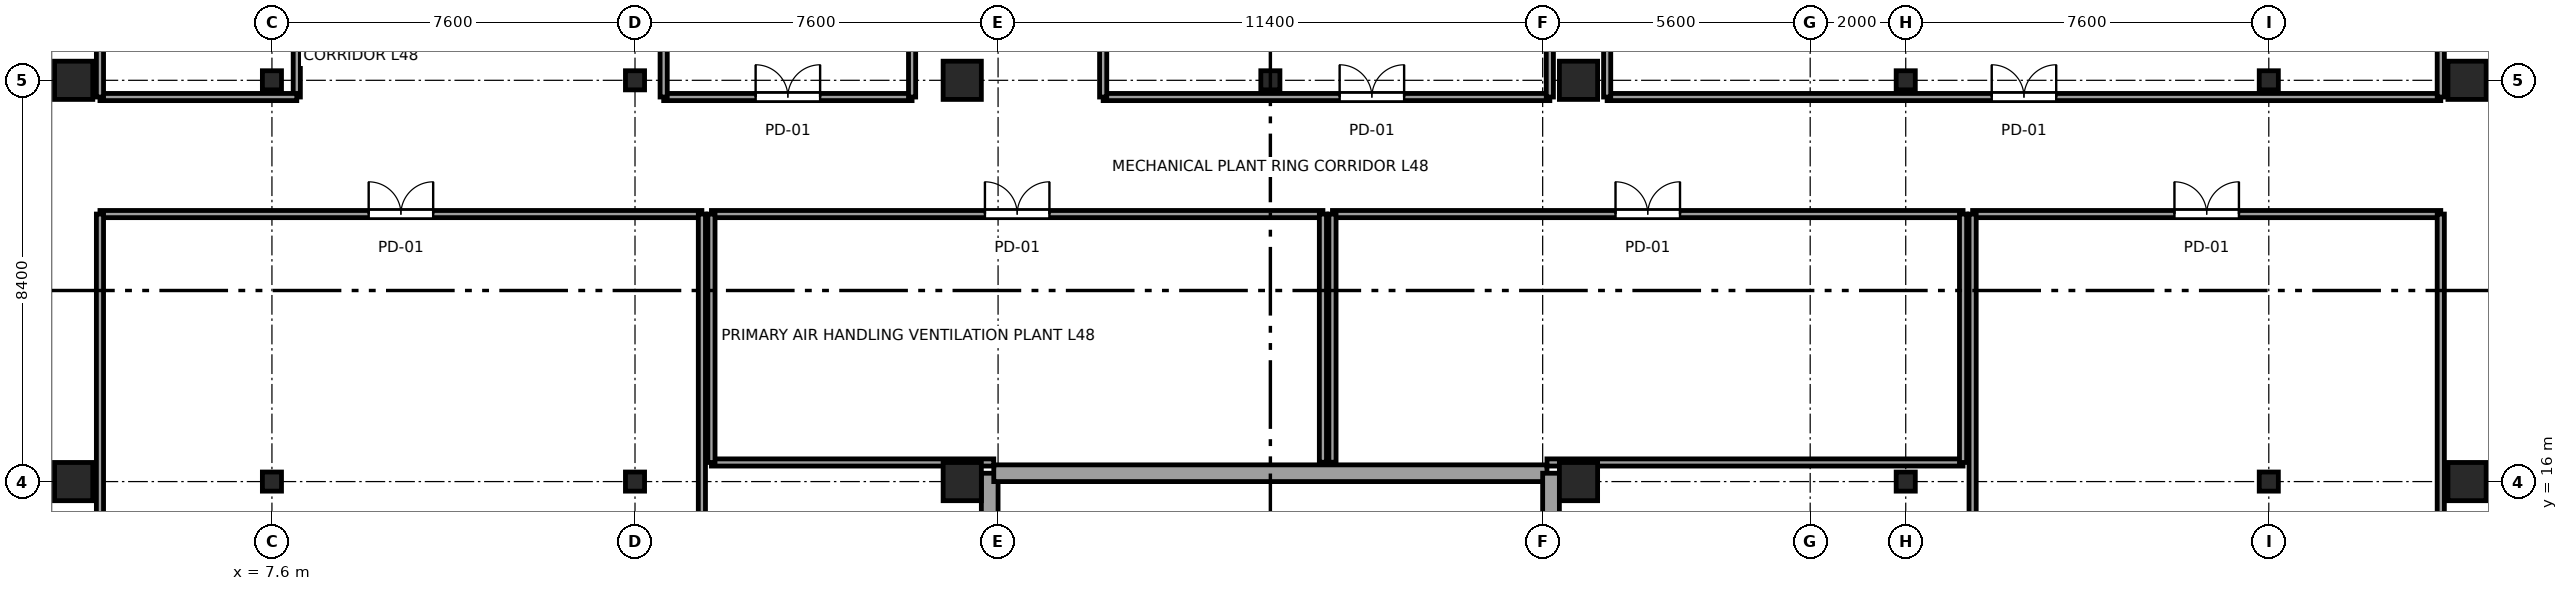
"""IFC4 building model, lengths in metres.
Left out: names, types, materials, properties, quantities, classifications, styles, units other than length and angle.
Written with IfcOpenShell. Run it as: python <this file> out.ifc"""

import sys

from ifc_helpers import new_model, si_unit, direction, frame, frame_2d, origin, origin_2d, place, context, subcontext, project, spatial, rectangle, i_section, extrude, source, transform, mapped, element, fill, save


model = new_model("IFC4")
c1 = context("Model", 3, precision=1e-05, world=origin(), true_north=direction((0.0, 1.0)))
c2 = subcontext(c1, "Body", "Model", "MODEL_VIEW")
j1 = project(units=[si_unit("LENGTHUNIT", "METRE"), si_unit("PLANEANGLEUNIT", "RADIAN")], contexts=[c1])
p1 = place(None, origin())
s1 = spatial("IfcSite", under=j1, at=p1, CompositionType="ELEMENT")
p2 = place(p1, origin())
s2 = spatial("IfcBuilding", under=s1, at=p2, CompositionType="ELEMENT")
p3 = place(p2, frame((0.0, 0.0, 182.55)))
s3 = spatial("IfcBuildingStorey", under=s2, at=p3, CompositionType="ELEMENT", Elevation=182.55)
m1 = source(origin(), c2, "Body", "SweptSolid", [
    extrude(rectangle(XDim=0.8, YDim=0.8, at=origin_2d()), origin(), (0.0, 0.0, 1.0), 5.0),
])
for number, where, z_axis, x_axis in (
    (1, (3.45, 16.0, 0.0), (0.0, 0.0, 1.0), (1.0, 0.0, 0.0)),
    (2, (3.45, 24.4, 0.0), (0.0, 0.0, 1.0), (1.0, 0.0, 0.0)),
):
    element("IfcColumn", number, at=place(p3, frame(where, z_axis=z_axis, x_axis=x_axis)), inside=s3, PredefinedType="COLUMN", context=c2, shape_type="MappedRepresentation", body=[
        mapped(m1, transform((0.0, 0.0, 0.0), x_axis=(1.0, 0.0, 0.0), y_axis=(0.0, 1.0, 0.0), z_axis=(0.0, 0.0, 1.0), scale=1.0)),
    ])
m2 = source(origin(), c2, "Body", "SweptSolid", [
    extrude(i_section(OverallWidth=0.4, OverallDepth=0.4, WebThickness=0.02, FlangeThickness=0.035, at=origin_2d()), origin(), (0.0, 0.0, 1.0), 5.0),
])
for number, where, z_axis, x_axis in (
    (3, (7.6, 16.0, 0.0), (0.0, 0.0, 1.0), (1.0, 0.0, 0.0)),
    (4, (7.6, 24.4, 0.0), (0.0, 0.0, 1.0), (1.0, 0.0, 0.0)),
    (5, (15.2, 16.0, 0.0), (0.0, 0.0, 1.0), (1.0, 0.0, 0.0)),
    (6, (15.2, 24.4, 0.0), (0.0, 0.0, 1.0), (1.0, 0.0, 0.0)),
):
    element("IfcColumn", number, at=place(p3, frame(where, z_axis=z_axis, x_axis=x_axis)), inside=s3, PredefinedType="COLUMN", context=c2, shape_type="MappedRepresentation", body=[
        mapped(m2, transform((0.0, 0.0, 0.0), x_axis=(1.0, 0.0, 0.0), y_axis=(0.0, 1.0, 0.0), z_axis=(0.0, 0.0, 1.0), scale=1.0)),
    ])
for number, where, z_axis, x_axis in (
    (7, (22.05, 16.0, 0.0), (0.0, 0.0, 1.0), (1.0, 0.0, 0.0)),
    (8, (22.05, 24.4, 0.0), (0.0, 0.0, 1.0), (1.0, 0.0, 0.0)),
    (9, (34.95, 16.0, 0.0), (0.0, 0.0, 1.0), (1.0, 0.0, 0.0)),
    (10, (34.95, 24.4, 0.0), (0.0, 0.0, 1.0), (1.0, 0.0, 0.0)),
):
    element("IfcColumn", number, at=place(p3, frame(where, z_axis=z_axis, x_axis=x_axis)), inside=s3, PredefinedType="COLUMN", context=c2, shape_type="MappedRepresentation", body=[
        mapped(m1, transform((0.0, 0.0, 0.0), x_axis=(1.0, 0.0, 0.0), y_axis=(0.0, 1.0, 0.0), z_axis=(0.0, 0.0, 1.0), scale=1.0)),
    ])
for number, where, z_axis, x_axis in (
    (11, (41.8, 16.0, 0.0), (0.0, 0.0, 1.0), (1.0, 0.0, 0.0)),
    (12, (41.8, 24.4, 0.0), (0.0, 0.0, 1.0), (1.0, 0.0, 0.0)),
    (13, (49.4, 16.0, 0.0), (0.0, 0.0, 1.0), (1.0, 0.0, 0.0)),
    (14, (49.4, 24.4, 0.0), (0.0, 0.0, 1.0), (1.0, 0.0, 0.0)),
):
    element("IfcColumn", number, at=place(p3, frame(where, z_axis=z_axis, x_axis=x_axis)), inside=s3, PredefinedType="COLUMN", context=c2, shape_type="MappedRepresentation", body=[
        mapped(m2, transform((0.0, 0.0, 0.0), x_axis=(1.0, 0.0, 0.0), y_axis=(0.0, 1.0, 0.0), z_axis=(0.0, 0.0, 1.0), scale=1.0)),
    ])
for number, where, z_axis, x_axis in (
    (15, (53.55, 16.0, 0.0), (0.0, 0.0, 1.0), (1.0, 0.0, 0.0)),
    (16, (53.55, 24.4, 0.0), (0.0, 0.0, 1.0), (1.0, 0.0, 0.0)),
):
    element("IfcColumn", number, at=place(p3, frame(where, z_axis=z_axis, x_axis=x_axis)), inside=s3, PredefinedType="COLUMN", context=c2, shape_type="MappedRepresentation", body=[
        mapped(m1, transform((0.0, 0.0, 0.0), x_axis=(1.0, 0.0, 0.0), y_axis=(0.0, 1.0, 0.0), z_axis=(0.0, 0.0, 1.0), scale=1.0)),
    ])
p4 = place(p3, frame((28.5, 24.4, 0.0), z_axis=(0.0, 0.0, 1.0), x_axis=(1.0, 0.0, 0.0)))
e17 = element("IfcColumn", 17, at=p4, inside=s3, PredefinedType="COLUMN", context=c2, shape_type="MappedRepresentation", body=[
    mapped(m2, transform((0.0, 0.0, 0.0), x_axis=(1.0, 0.0, 0.0), y_axis=(0.0, 1.0, 0.0), z_axis=(0.0, 0.0, 1.0), scale=1.0)),
])
p5 = place(p3, frame((22.625, 2.775, 0.0), z_axis=(0.0, 0.0, 1.0), x_axis=(0.0, 1.0, 0.0)))
e18 = element("IfcWall", 18, at=p5, inside=s3, PredefinedType="SOLIDWALL", context=c2, shape_type="SweptSolid", body=[
    extrude(rectangle(XDim=13.4, YDim=0.35, at=frame_2d((6.7, 0.0))), origin(), (0.0, 0.0, 1.0), 4.82),
])
p6 = place(p3, frame((22.71, 16.175, 0.0), z_axis=(0.0, 0.0, 1.0), x_axis=(1.0, 0.0, 0.0)))
e19 = element("IfcWall", 19, at=p6, inside=s3, PredefinedType="SOLIDWALL", context=c2, shape_type="SweptSolid", body=[
    extrude(rectangle(XDim=11.58, YDim=0.35, at=frame_2d((5.79, 0.0))), origin(), (0.0, 0.0, 1.0), 4.208),
])
p7 = place(p3, frame((34.375, 16.175, 0.0), z_axis=(0.0, 0.0, 1.0), x_axis=(0.0, -1.0, 0.0)))
e20 = element("IfcWall", 20, at=p7, inside=s3, PredefinedType="SOLIDWALL", context=c2, shape_type="SweptSolid", body=[
    extrude(rectangle(XDim=13.4, YDim=0.35, at=frame_2d((6.7, 0.0))), origin(), (0.0, 0.0, 1.0), 4.82),
])
p8 = place(p3, frame((8.12, 24.05, 0.0), z_axis=(0.0, 0.0, 1.0), x_axis=(0.0, 1.0, 0.0)))
e21 = element("IfcWall", 21, at=p8, inside=s3, PredefinedType="PARTITIONING", context=c2, shape_type="SweptSolid", body=[
    extrude(rectangle(XDim=11.55, YDim=0.15, at=frame_2d((5.775, 0.0))), origin(), (0.0, 0.0, 1.0), 4.82),
])
p9 = place(p8, frame((4.125, 0.0, 0.0)))
e22 = element("IfcOpeningElement", 22, at=p9, cuts=e21, PredefinedType="OPENING", context=c2, shape_type="SweptSolid", body=[
    extrude(rectangle(XDim=1.35, YDim=2.15, at=frame_2d((0.675, 1.075))), frame((0.0, 0.085, 0.0), z_axis=(0.0, -1.0, 0.0), x_axis=(1.0, 0.0, 0.0)), (0.0, 0.0, 1.0), 0.17),
])
p10 = place(p3, frame((4.0, 24.05, 0.0), z_axis=(0.0, 0.0, 1.0), x_axis=(1.0, 0.0, 0.0)))
e23 = element("IfcWall", 23, at=p10, inside=s3, PredefinedType="PARTITIONING", context=c2, shape_type="SweptSolid", body=[
    extrude(rectangle(XDim=4.12, YDim=0.15, at=frame_2d((2.06, 0.0))), origin(), (0.0, 0.0, 1.0), 4.82),
])
p11 = place(p3, frame((4.0, 24.05, 0.0), z_axis=(0.0, 0.0, 1.0), x_axis=(0.0, 1.0, 0.0)))
e24 = element("IfcWall", 24, at=p11, inside=s3, PredefinedType="PARTITIONING", context=c2, shape_type="SweptSolid", body=[
    extrude(rectangle(XDim=11.55, YDim=0.15, at=frame_2d((5.775, 0.0))), origin(), (0.0, 0.0, 1.0), 4.282),
])
p12 = place(p3, frame((15.8, 24.05, 0.0), z_axis=(0.0, 0.0, 1.0), x_axis=(1.0, 0.0, 0.0)))
e25 = element("IfcWall", 25, at=p12, inside=s3, PredefinedType="PARTITIONING", context=c2, shape_type="SweptSolid", body=[
    extrude(rectangle(XDim=5.2, YDim=0.15, at=frame_2d((2.6, 0.0))), origin(), (0.0, 0.0, 1.0), 4.82),
])
p13 = place(p12, frame((1.925, 0.0, 0.0)))
e26 = element("IfcOpeningElement", 26, at=p13, cuts=e25, PredefinedType="OPENING", context=c2, shape_type="SweptSolid", body=[
    extrude(rectangle(XDim=1.35, YDim=2.15, at=frame_2d((0.675, 1.075))), frame((0.0, 0.085, 0.0), z_axis=(0.0, -1.0, 0.0), x_axis=(1.0, 0.0, 0.0)), (0.0, 0.0, 1.0), 0.17),
])
for number, where, z_axis, x_axis in (
    (27, (15.8, 24.05, 0.0), (0.0, 0.0, 1.0), (0.0, 1.0, 0.0)),
    (28, (21.0, 24.05, 0.0), (0.0, 0.0, 1.0), (0.0, 1.0, 0.0)),
):
    element("IfcWall", number, at=place(p3, frame(where, z_axis=z_axis, x_axis=x_axis)), inside=s3, PredefinedType="PARTITIONING", context=c2, shape_type="SweptSolid", body=[
        extrude(rectangle(XDim=5.4, YDim=0.15, at=frame_2d((2.7, 0.0))), origin(), (0.0, 0.0, 1.0), 4.82),
    ])
p14 = place(p3, frame((25.0, 24.05, 0.0), z_axis=(0.0, 0.0, 1.0), x_axis=(1.0, 0.0, 0.0)))
e29 = element("IfcWall", 29, at=p14, inside=s3, PredefinedType="PARTITIONING", context=c2, shape_type="SweptSolid", body=[
    extrude(rectangle(XDim=9.35, YDim=0.15, at=frame_2d((4.675, 0.0))), origin(), (0.0, 0.0, 1.0), 4.82),
])
p15 = place(p14, frame((4.95, 0.0, 0.0)))
e30 = element("IfcOpeningElement", 30, at=p15, cuts=e29, PredefinedType="OPENING", context=c2, shape_type="SweptSolid", body=[
    extrude(rectangle(XDim=1.35, YDim=2.15, at=frame_2d((0.675, 1.075))), frame((0.0, 0.085, 0.0), z_axis=(0.0, -1.0, 0.0), x_axis=(1.0, 0.0, 0.0)), (0.0, 0.0, 1.0), 0.17),
])
for number, where, z_axis, x_axis in (
    (31, (25.0, 24.05, 0.0), (0.0, 0.0, 1.0), (0.0, 1.0, 0.0)),
    (32, (34.35, 24.05, 0.0), (0.0, 0.0, 1.0), (0.0, 1.0, 0.0)),
):
    element("IfcWall", number, at=place(p3, frame(where, z_axis=z_axis, x_axis=x_axis)), inside=s3, PredefinedType="PARTITIONING", context=c2, shape_type="SweptSolid", body=[
        extrude(rectangle(XDim=5.4, YDim=0.15, at=frame_2d((2.7, 0.0))), origin(), (0.0, 0.0, 1.0), 4.82),
    ])
p16 = place(p3, frame((35.55, 24.05, 0.0), z_axis=(0.0, 0.0, 1.0), x_axis=(1.0, 0.0, 0.0)))
e33 = element("IfcWall", 33, at=p16, inside=s3, PredefinedType="PARTITIONING", context=c2, shape_type="SweptSolid", body=[
    extrude(rectangle(XDim=17.45, YDim=0.15, at=frame_2d((8.725, 0.0))), origin(), (0.0, 0.0, 1.0), 4.82),
])
p17 = place(p16, frame((8.05, 0.0, 0.0)))
e34 = element("IfcOpeningElement", 34, at=p17, cuts=e33, PredefinedType="OPENING", context=c2, shape_type="SweptSolid", body=[
    extrude(rectangle(XDim=1.35, YDim=2.15, at=frame_2d((0.675, 1.075))), frame((0.0, 0.085, 0.0), z_axis=(0.0, -1.0, 0.0), x_axis=(1.0, 0.0, 0.0)), (0.0, 0.0, 1.0), 0.17),
])
for number, where, z_axis, x_axis in (
    (35, (35.55, 24.05, 0.0), (0.0, 0.0, 1.0), (0.0, 1.0, 0.0)),
    (36, (53.0, 24.05, 0.0), (0.0, 0.0, 1.0), (0.0, 1.0, 0.0)),
):
    element("IfcWall", number, at=place(p3, frame(where, z_axis=z_axis, x_axis=x_axis)), inside=s3, PredefinedType="PARTITIONING", context=c2, shape_type="SweptSolid", body=[
        extrude(rectangle(XDim=5.4, YDim=0.15, at=frame_2d((2.7, 0.0))), origin(), (0.0, 0.0, 1.0), 4.82),
    ])
p18 = place(p3, frame((4.0, 21.6, 0.0), z_axis=(0.0, 0.0, 1.0), x_axis=(1.0, 0.0, 0.0)))
e37 = element("IfcWall", 37, at=p18, inside=s3, PredefinedType="PARTITIONING", context=c2, shape_type="SweptSolid", body=[
    extrude(rectangle(XDim=12.6, YDim=0.15, at=frame_2d((6.3, 0.0))), origin(), (0.0, 0.0, 1.0), 4.82),
])
p19 = place(p18, frame((5.625, 0.0, 0.0)))
e38 = element("IfcOpeningElement", 38, at=p19, cuts=e37, PredefinedType="OPENING", context=c2, shape_type="SweptSolid", body=[
    extrude(rectangle(XDim=1.35, YDim=2.15, at=frame_2d((0.675, 1.075))), frame((0.0, 0.085, 0.0), z_axis=(0.0, -1.0, 0.0), x_axis=(1.0, 0.0, 0.0)), (0.0, 0.0, 1.0), 0.17),
])
p20 = place(p3, frame((4.0, 5.385, 0.0), z_axis=(0.0, 0.0, 1.0), x_axis=(0.0, 1.0, 0.0)))
e39 = element("IfcWall", 39, at=p20, inside=s3, PredefinedType="PARTITIONING", context=c2, shape_type="SweptSolid", body=[
    extrude(rectangle(XDim=16.215, YDim=0.15, at=frame_2d((8.107, 0.0))), origin(), (0.0, 0.0, 1.0), 4.282),
])
p21 = place(p3, frame((16.6, 3.005, 0.0), z_axis=(0.0, 0.0, 1.0), x_axis=(0.0, 1.0, 0.0)))
e40 = element("IfcWall", 40, at=p21, inside=s3, PredefinedType="PARTITIONING", context=c2, shape_type="SweptSolid", body=[
    extrude(rectangle(XDim=18.595, YDim=0.15, at=frame_2d((9.298, 0.0))), origin(), (0.0, 0.0, 1.0), 4.82),
])
p22 = place(p3, frame((16.8, 16.4, 0.0), z_axis=(0.0, 0.0, 1.0), x_axis=(1.0, 0.0, 0.0)))
e41 = element("IfcWall", 41, at=p22, inside=s3, PredefinedType="PARTITIONING", context=c2, shape_type="SweptSolid", body=[
    extrude(rectangle(XDim=5.91, YDim=0.15, at=frame_2d((2.955, 0.0))), origin(), (0.0, 0.0, 1.0), 4.82),
])
p23 = place(p3, frame((16.8, 21.6, 0.0), z_axis=(0.0, 0.0, 1.0), x_axis=(1.0, 0.0, 0.0)))
e42 = element("IfcWall", 42, at=p23, inside=s3, PredefinedType="PARTITIONING", context=c2, shape_type="SweptSolid", body=[
    extrude(rectangle(XDim=12.8, YDim=0.15, at=frame_2d((6.4, 0.0))), origin(), (0.0, 0.0, 1.0), 4.82),
])
p24 = place(p23, frame((5.725, 0.0, 0.0)))
e43 = element("IfcOpeningElement", 43, at=p24, cuts=e42, PredefinedType="OPENING", context=c2, shape_type="SweptSolid", body=[
    extrude(rectangle(XDim=1.35, YDim=2.15, at=frame_2d((0.675, 1.075))), frame((0.0, 0.085, 0.0), z_axis=(0.0, -1.0, 0.0), x_axis=(1.0, 0.0, 0.0)), (0.0, 0.0, 1.0), 0.17),
])
p25 = place(p3, frame((16.8, 16.4, 0.0), z_axis=(0.0, 0.0, 1.0), x_axis=(0.0, 1.0, 0.0)))
e44 = element("IfcWall", 44, at=p25, inside=s3, PredefinedType="PARTITIONING", context=c2, shape_type="SweptSolid", body=[
    extrude(rectangle(XDim=5.2, YDim=0.15, at=frame_2d((2.6, 0.0))), origin(), (0.0, 0.0, 1.0), 4.82),
])
p26 = place(p3, frame((29.6, 16.405, 0.0), z_axis=(0.0, 0.0, 1.0), x_axis=(0.0, 1.0, 0.0)))
e45 = element("IfcWall", 45, at=p26, inside=s3, PredefinedType="PARTITIONING", context=c2, shape_type="SweptSolid", body=[
    extrude(rectangle(XDim=5.195, YDim=0.15, at=frame_2d((2.598, 0.0))), origin(), (0.0, 0.0, 1.0), 4.82),
])
p27 = place(p3, frame((34.29, 16.4, 0.0), z_axis=(0.0, 0.0, 1.0), x_axis=(1.0, 0.0, 0.0)))
e46 = element("IfcWall", 46, at=p27, inside=s3, PredefinedType="PARTITIONING", context=c2, shape_type="SweptSolid", body=[
    extrude(rectangle(XDim=8.71, YDim=0.15, at=frame_2d((4.355, 0.0))), origin(), (0.0, 0.0, 1.0), 4.82),
])
p28 = place(p3, frame((29.8, 21.6, 0.0), z_axis=(0.0, 0.0, 1.0), x_axis=(1.0, 0.0, 0.0)))
e47 = element("IfcWall", 47, at=p28, inside=s3, PredefinedType="PARTITIONING", context=c2, shape_type="SweptSolid", body=[
    extrude(rectangle(XDim=13.2, YDim=0.15, at=frame_2d((6.6, 0.0))), origin(), (0.0, 0.0, 1.0), 4.82),
])
p29 = place(p28, frame((5.925, 0.0, 0.0)))
e48 = element("IfcOpeningElement", 48, at=p29, cuts=e47, PredefinedType="OPENING", context=c2, shape_type="SweptSolid", body=[
    extrude(rectangle(XDim=1.35, YDim=2.15, at=frame_2d((0.675, 1.075))), frame((0.0, 0.085, 0.0), z_axis=(0.0, -1.0, 0.0), x_axis=(1.0, 0.0, 0.0)), (0.0, 0.0, 1.0), 0.17),
])
p30 = place(p3, frame((29.8, 16.405, 0.0), z_axis=(0.0, 0.0, 1.0), x_axis=(0.0, 1.0, 0.0)))
e49 = element("IfcWall", 49, at=p30, inside=s3, PredefinedType="PARTITIONING", context=c2, shape_type="SweptSolid", body=[
    extrude(rectangle(XDim=5.195, YDim=0.15, at=frame_2d((2.598, 0.0))), origin(), (0.0, 0.0, 1.0), 4.82),
])
p31 = place(p3, frame((43.0, 16.4, 0.0), z_axis=(0.0, 0.0, 1.0), x_axis=(0.0, 1.0, 0.0)))
e50 = element("IfcWall", 50, at=p31, inside=s3, PredefinedType="PARTITIONING", context=c2, shape_type="SweptSolid", body=[
    extrude(rectangle(XDim=5.2, YDim=0.15, at=frame_2d((2.6, 0.0))), origin(), (0.0, 0.0, 1.0), 4.82),
])
p32 = place(p3, frame((43.2, 21.6, 0.0), z_axis=(0.0, 0.0, 1.0), x_axis=(1.0, 0.0, 0.0)))
e51 = element("IfcWall", 51, at=p32, inside=s3, PredefinedType="PARTITIONING", context=c2, shape_type="SweptSolid", body=[
    extrude(rectangle(XDim=9.8, YDim=0.15, at=frame_2d((4.9, 0.0))), origin(), (0.0, 0.0, 1.0), 4.82),
])
p33 = place(p32, frame((4.225, 0.0, 0.0)))
e52 = element("IfcOpeningElement", 52, at=p33, cuts=e51, PredefinedType="OPENING", context=c2, shape_type="SweptSolid", body=[
    extrude(rectangle(XDim=1.35, YDim=2.15, at=frame_2d((0.675, 1.075))), frame((0.0, 0.085, 0.0), z_axis=(0.0, -1.0, 0.0), x_axis=(1.0, 0.0, 0.0)), (0.0, 0.0, 1.0), 0.17),
])
p34 = place(p3, frame((43.2, 3.005, 0.0), z_axis=(0.0, 0.0, 1.0), x_axis=(0.0, 1.0, 0.0)))
e53 = element("IfcWall", 53, at=p34, inside=s3, PredefinedType="PARTITIONING", context=c2, shape_type="SweptSolid", body=[
    extrude(rectangle(XDim=18.595, YDim=0.15, at=frame_2d((9.298, 0.0))), origin(), (0.0, 0.0, 1.0), 4.82),
])
p35 = place(p3, frame((53.0, 5.385, 0.0), z_axis=(0.0, 0.0, 1.0), x_axis=(0.0, 1.0, 0.0)))
e54 = element("IfcWall", 54, at=p35, inside=s3, PredefinedType="PARTITIONING", context=c2, shape_type="SweptSolid", body=[
    extrude(rectangle(XDim=16.215, YDim=0.15, at=frame_2d((8.107, 0.0))), origin(), (0.0, 0.0, 1.0), 4.282),
])
m3 = source(origin(), c2, "Body", "SweptSolid", [
    extrude(rectangle(XDim=1.35, YDim=2.15, at=frame_2d((0.675, 1.075))), frame((0.0, 0.025, 0.0), z_axis=(0.0, -1.0, 0.0), x_axis=(1.0, 0.0, 0.0)), (0.0, 0.0, 1.0), 0.05),
])
p36 = place(p13, origin())
e55 = element("IfcDoor", 55, at=p36, inside=s3, OperationType="DOUBLE_DOOR_SINGLE_SWING", PredefinedType="DOOR", context=c2, shape_type="MappedRepresentation", body=[
    mapped(m3, transform((0.0, 0.0, 0.0), x_axis=(1.0, 0.0, 0.0), y_axis=(0.0, 1.0, 0.0), z_axis=(0.0, 0.0, 1.0), scale=1.0)),
])
fill(e26, e55)
p37 = place(p15, origin())
e56 = element("IfcDoor", 56, at=p37, inside=s3, OperationType="DOUBLE_DOOR_SINGLE_SWING", PredefinedType="DOOR", context=c2, shape_type="MappedRepresentation", body=[
    mapped(m3, transform((0.0, 0.0, 0.0), x_axis=(1.0, 0.0, 0.0), y_axis=(0.0, 1.0, 0.0), z_axis=(0.0, 0.0, 1.0), scale=1.0)),
])
fill(e30, e56)
p38 = place(p17, origin())
e57 = element("IfcDoor", 57, at=p38, inside=s3, OperationType="DOUBLE_DOOR_SINGLE_SWING", PredefinedType="DOOR", context=c2, shape_type="MappedRepresentation", body=[
    mapped(m3, transform((0.0, 0.0, 0.0), x_axis=(1.0, 0.0, 0.0), y_axis=(0.0, 1.0, 0.0), z_axis=(0.0, 0.0, 1.0), scale=1.0)),
])
fill(e34, e57)
p39 = place(p19, origin())
e58 = element("IfcDoor", 58, at=p39, inside=s3, OperationType="DOUBLE_DOOR_SINGLE_SWING", PredefinedType="DOOR", context=c2, shape_type="MappedRepresentation", body=[
    mapped(m3, transform((0.0, 0.0, 0.0), x_axis=(1.0, 0.0, 0.0), y_axis=(0.0, 1.0, 0.0), z_axis=(0.0, 0.0, 1.0), scale=1.0)),
])
fill(e38, e58)
p40 = place(p24, origin())
e59 = element("IfcDoor", 59, at=p40, inside=s3, OperationType="DOUBLE_DOOR_SINGLE_SWING", PredefinedType="DOOR", context=c2, shape_type="MappedRepresentation", body=[
    mapped(m3, transform((0.0, 0.0, 0.0), x_axis=(1.0, 0.0, 0.0), y_axis=(0.0, 1.0, 0.0), z_axis=(0.0, 0.0, 1.0), scale=1.0)),
])
fill(e43, e59)
p41 = place(p29, origin())
e60 = element("IfcDoor", 60, at=p41, inside=s3, OperationType="DOUBLE_DOOR_SINGLE_SWING", PredefinedType="DOOR", context=c2, shape_type="MappedRepresentation", body=[
    mapped(m3, transform((0.0, 0.0, 0.0), x_axis=(1.0, 0.0, 0.0), y_axis=(0.0, 1.0, 0.0), z_axis=(0.0, 0.0, 1.0), scale=1.0)),
])
fill(e48, e60)
p42 = place(p33, origin())
e61 = element("IfcDoor", 61, at=p42, inside=s3, OperationType="DOUBLE_DOOR_SINGLE_SWING", PredefinedType="DOOR", context=c2, shape_type="MappedRepresentation", body=[
    mapped(m3, transform((0.0, 0.0, 0.0), x_axis=(1.0, 0.0, 0.0), y_axis=(0.0, 1.0, 0.0), z_axis=(0.0, 0.0, 1.0), scale=1.0)),
])
fill(e52, e61)
save(model, sys.argv[1])
